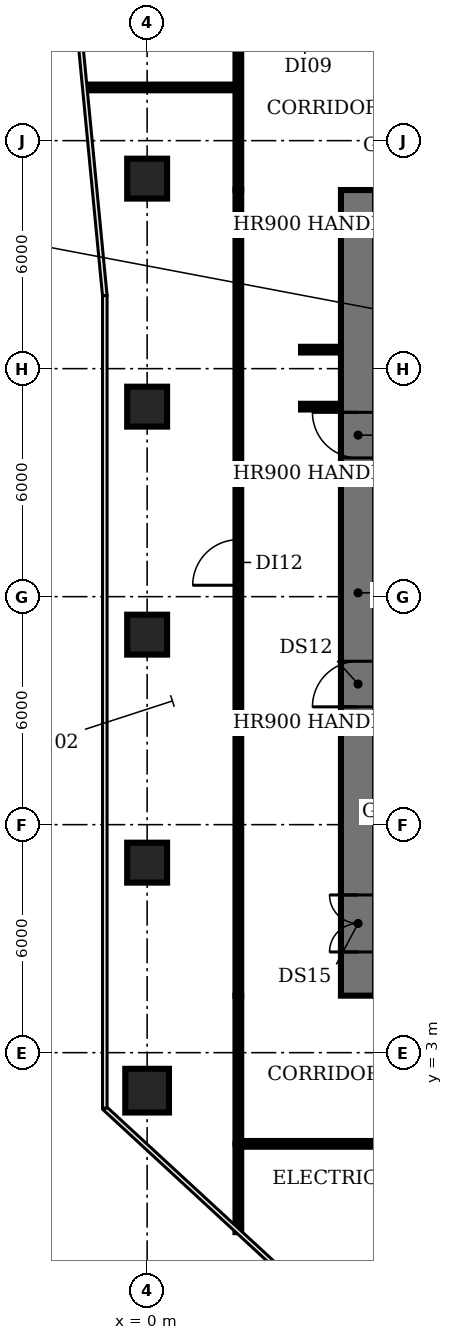
"""IFC4 building model, lengths in metres.
Left out: names, types, materials, properties, quantities, classifications, styles, units other than length and angle.
Written with IfcOpenShell. Run it as: python <this file> out.ifc"""

import sys

from ifc_helpers import new_model, si_unit, direction, frame, frame_2d, origin, origin_2d, place, context, subcontext, project, spatial, rectangle, circle, extrude, element, fill, save


model = new_model("IFC4")
c1 = context("Model", 3, precision=1e-05, world=origin(), true_north=direction((0.0, 1.0)))
c2 = subcontext(c1, "Body", "Model", "MODEL_VIEW")
j1 = project(units=[si_unit("LENGTHUNIT", "METRE"), si_unit("PLANEANGLEUNIT", "RADIAN")], contexts=[c1])
p1 = place(None, origin())
s1 = spatial("IfcSite", under=j1, at=p1, CompositionType="ELEMENT")
p2 = place(p1, origin())
s2 = spatial("IfcBuilding", under=s1, at=p2, CompositionType="ELEMENT")
p3 = place(p2, frame((0.0, 0.0, 75.2)))
s3 = spatial("IfcBuildingStorey", under=s2, at=p3, CompositionType="ELEMENT", Elevation=75.2)
p4 = place(p3, frame((0.0, 2.0, 0.0), z_axis=(0.0, 0.0, 1.0), x_axis=(1.0, 0.0, 0.0)))
e1 = element("IfcColumn", 1, at=p4, inside=s3, PredefinedType="COLUMN", context=c2, shape_type="SweptSolid", body=[
    extrude(circle(Radius=0.575, at=origin_2d()), origin(), (0.0, 0.0, 1.0), 3.2),
])
for number, where, z_axis, x_axis in (
    (2, (0.0, 8.0, 0.0), (0.0, 0.0, 1.0), (1.0, 0.0, 0.0)),
    (3, (0.0, 14.0, 0.0), (0.0, 0.0, 1.0), (1.0, 0.0, 0.0)),
    (4, (0.0, 20.0, 0.0), (0.0, 0.0, 1.0), (1.0, 0.0, 0.0)),
    (5, (0.0, 26.0, 0.0), (0.0, 0.0, 1.0), (1.0, 0.0, 0.0)),
):
    element("IfcColumn", number, at=place(p3, frame(where, z_axis=z_axis, x_axis=x_axis)), inside=s3, PredefinedType="COLUMN", context=c2, shape_type="SweptSolid", body=[
        extrude(rectangle(XDim=1.05, YDim=1.05, at=origin_2d()), origin(), (0.0, 0.0, 1.0), 3.2),
    ])
p5 = place(p3, frame((5.55, 4.5, 0.0), z_axis=(0.0, 0.0, 1.0), x_axis=(0.0, 1.0, 0.0)))
e6 = element("IfcWall", 6, at=p5, inside=s3, PredefinedType="SHEAR", context=c2, shape_type="SweptSolid", body=[
    extrude(rectangle(XDim=21.2, YDim=0.9, at=frame_2d((10.6, 0.0))), origin(), (0.0, 0.0, 1.0), 3.8),
])
p6 = place(p5, frame((1.15, 0.0, 0.0)))
e7 = element("IfcOpeningElement", 7, at=p6, cuts=e6, PredefinedType="OPENING", context=c2, shape_type="SweptSolid", body=[
    extrude(rectangle(XDim=1.5, YDim=2.1, at=frame_2d((0.75, 1.05))), frame((0.0, 0.46, 0.0), z_axis=(0.0, -1.0, 0.0), x_axis=(1.0, 0.0, 0.0)), (0.0, 0.0, 1.0), 0.92),
])
p7 = place(p5, frame((7.6, 0.0, 0.0)))
e8 = element("IfcOpeningElement", 8, at=p7, cuts=e6, PredefinedType="OPENING", context=c2, shape_type="SweptSolid", body=[
    extrude(rectangle(XDim=1.2, YDim=2.1, at=frame_2d((0.6, 1.05))), frame((0.0, 0.46, 0.0), z_axis=(0.0, -1.0, 0.0), x_axis=(1.0, 0.0, 0.0)), (0.0, 0.0, 1.0), 0.92),
])
p8 = place(p5, frame((14.15, 0.0, 0.0)))
e9 = element("IfcOpeningElement", 9, at=p8, cuts=e6, PredefinedType="OPENING", context=c2, shape_type="SweptSolid", body=[
    extrude(rectangle(XDim=1.2, YDim=2.1, at=frame_2d((0.6, 1.05))), frame((0.0, 0.46, 0.0), z_axis=(0.0, -1.0, 0.0), x_axis=(1.0, 0.0, 0.0)), (0.0, 0.0, 1.0), 0.92),
])
p9 = place(p3, frame((-1.59, 28.4, 0.0), z_axis=(0.0, 0.0, 1.0), x_axis=(1.0, 0.0, 0.0)))
e10 = element("IfcWall", 10, at=p9, inside=s3, PredefinedType="PARTITIONING", context=c2, shape_type="SweptSolid", body=[
    extrude(rectangle(XDim=3.99, YDim=0.15, at=frame_2d((1.995, 0.0))), origin(), (0.0, 0.0, 1.0), 2.78),
])
p10 = place(p3, frame((2.4, -1.723, 0.0), z_axis=(0.0, 0.0, 1.0), x_axis=(0.0, 1.0, 0.0)))
e11 = element("IfcWall", 11, at=p10, inside=s3, PredefinedType="PARTITIONING", context=c2, shape_type="SweptSolid", body=[
    extrude(rectangle(XDim=2.323, YDim=0.15, at=frame_2d((1.161, 0.0))), origin(), (0.0, 0.0, 1.0), 2.78),
])
p11 = place(p3, frame((2.4, 0.6, 0.0), z_axis=(0.0, 0.0, 1.0), x_axis=(0.0, 1.0, 0.0)))
e12 = element("IfcWall", 12, at=p11, inside=s3, PredefinedType="PARTITIONING", context=c2, shape_type="SweptSolid", body=[
    extrude(rectangle(XDim=3.9, YDim=0.15, at=frame_2d((1.95, 0.0))), origin(), (0.0, 0.0, 1.0), 2.78),
])
p12 = place(p3, frame((2.4, 4.5, 0.0), z_axis=(0.0, 0.0, 1.0), x_axis=(0.0, 1.0, 0.0)))
e13 = element("IfcWall", 13, at=p12, inside=s3, PredefinedType="PARTITIONING", context=c2, shape_type="SweptSolid", body=[
    extrude(rectangle(XDim=21.2, YDim=0.15, at=frame_2d((10.6, 0.0))), origin(), (0.0, 0.0, 1.0), 2.78),
])
p13 = place(p12, frame((10.8, 0.0, 0.0)))
e14 = element("IfcOpeningElement", 14, at=p13, cuts=e13, PredefinedType="OPENING", context=c2, shape_type="SweptSolid", body=[
    extrude(rectangle(XDim=1.2, YDim=2.1, at=frame_2d((0.6, 1.05))), frame((0.0, 0.085, 0.0), z_axis=(0.0, -1.0, 0.0), x_axis=(1.0, 0.0, 0.0)), (0.0, 0.0, 1.0), 0.17),
])
p14 = place(p3, frame((2.4, 25.7, 0.0), z_axis=(0.0, 0.0, 1.0), x_axis=(0.0, 1.0, 0.0)))
e15 = element("IfcWall", 15, at=p14, inside=s3, PredefinedType="PARTITIONING", context=c2, shape_type="SweptSolid", body=[
    extrude(rectangle(XDim=3.9, YDim=0.15, at=frame_2d((1.95, 0.0))), origin(), (0.0, 0.0, 1.0), 2.78),
])
for number, where, z_axis, x_axis in (
    (16, (4.05, 20.0, 0.0), (0.0, 0.0, 1.0), (1.0, 0.0, 0.0)),
    (17, (4.05, 21.5, 0.0), (0.0, 0.0, 1.0), (1.0, 0.0, 0.0)),
):
    element("IfcWall", number, at=place(p3, frame(where, z_axis=z_axis, x_axis=x_axis)), inside=s3, PredefinedType="PARTITIONING", context=c2, shape_type="SweptSolid", body=[
        extrude(rectangle(XDim=1.05, YDim=0.15, at=frame_2d((0.525, 0.0))), origin(), (0.0, 0.0, 1.0), 2.78),
    ])
p15 = place(p3, frame((27.6, 0.6, 0.0), z_axis=(0.0, 0.0, 1.0), x_axis=(-1.0, 0.0, 0.0)))
e18 = element("IfcWall", 18, at=p15, inside=s3, PredefinedType="PARTITIONING", context=c2, shape_type="SweptSolid", body=[
    extrude(rectangle(XDim=25.2, YDim=0.15, at=frame_2d((12.6, 0.0))), origin(), (0.0, 0.0, 1.0), 2.78),
])
p16 = place(p15, frame((12.1, 0.0, 0.0)))
e19 = element("IfcOpeningElement", 19, at=p16, cuts=e18, PredefinedType="OPENING", context=c2, shape_type="SweptSolid", body=[
    extrude(rectangle(XDim=1.2, YDim=2.1, at=frame_2d((0.6, 1.05))), frame((0.0, 0.085, 0.0), z_axis=(0.0, -1.0, 0.0), x_axis=(1.0, 0.0, 0.0)), (0.0, 0.0, 1.0), 0.17),
])
p17 = place(p6, origin())
e20 = element("IfcDoor", 20, at=p17, inside=s3, OperationType="DOUBLE_DOOR_SINGLE_SWING", PredefinedType="DOOR", context=c2, shape_type="SweptSolid", body=[
    extrude(rectangle(XDim=1.5, YDim=2.1, at=frame_2d((0.75, 1.05))), frame((0.0, 0.025, 0.0), z_axis=(0.0, -1.0, 0.0), x_axis=(1.0, 0.0, 0.0)), (0.0, 0.0, 1.0), 0.05),
])
fill(e7, e20)
p18 = place(p7, origin())
e21 = element("IfcDoor", 21, at=p18, inside=s3, OperationType="SINGLE_SWING_LEFT", PredefinedType="DOOR", context=c2, shape_type="SweptSolid", body=[
    extrude(rectangle(XDim=1.2, YDim=2.1, at=frame_2d((0.6, 1.05))), frame((0.0, 0.025, 0.0), z_axis=(0.0, -1.0, 0.0), x_axis=(1.0, 0.0, 0.0)), (0.0, 0.0, 1.0), 0.05),
])
fill(e8, e21)
p19 = place(p8, origin())
e22 = element("IfcDoor", 22, at=p19, inside=s3, OperationType="SINGLE_SWING_RIGHT", PredefinedType="DOOR", context=c2, shape_type="SweptSolid", body=[
    extrude(rectangle(XDim=1.2, YDim=2.1, at=frame_2d((0.6, 1.05))), frame((0.0, 0.025, 0.0), z_axis=(0.0, -1.0, 0.0), x_axis=(1.0, 0.0, 0.0)), (0.0, 0.0, 1.0), 0.05),
])
fill(e9, e22)
p20 = place(p13, origin())
e23 = element("IfcDoor", 23, at=p20, inside=s3, OperationType="SINGLE_SWING_LEFT", PredefinedType="DOOR", context=c2, shape_type="SweptSolid", body=[
    extrude(rectangle(XDim=1.2, YDim=2.1, at=frame_2d((0.6, 1.05))), frame((0.0, 0.025, 0.0), z_axis=(0.0, -1.0, 0.0), x_axis=(1.0, 0.0, 0.0)), (0.0, 0.0, 1.0), 0.05),
])
fill(e14, e23)
save(model, sys.argv[1])
